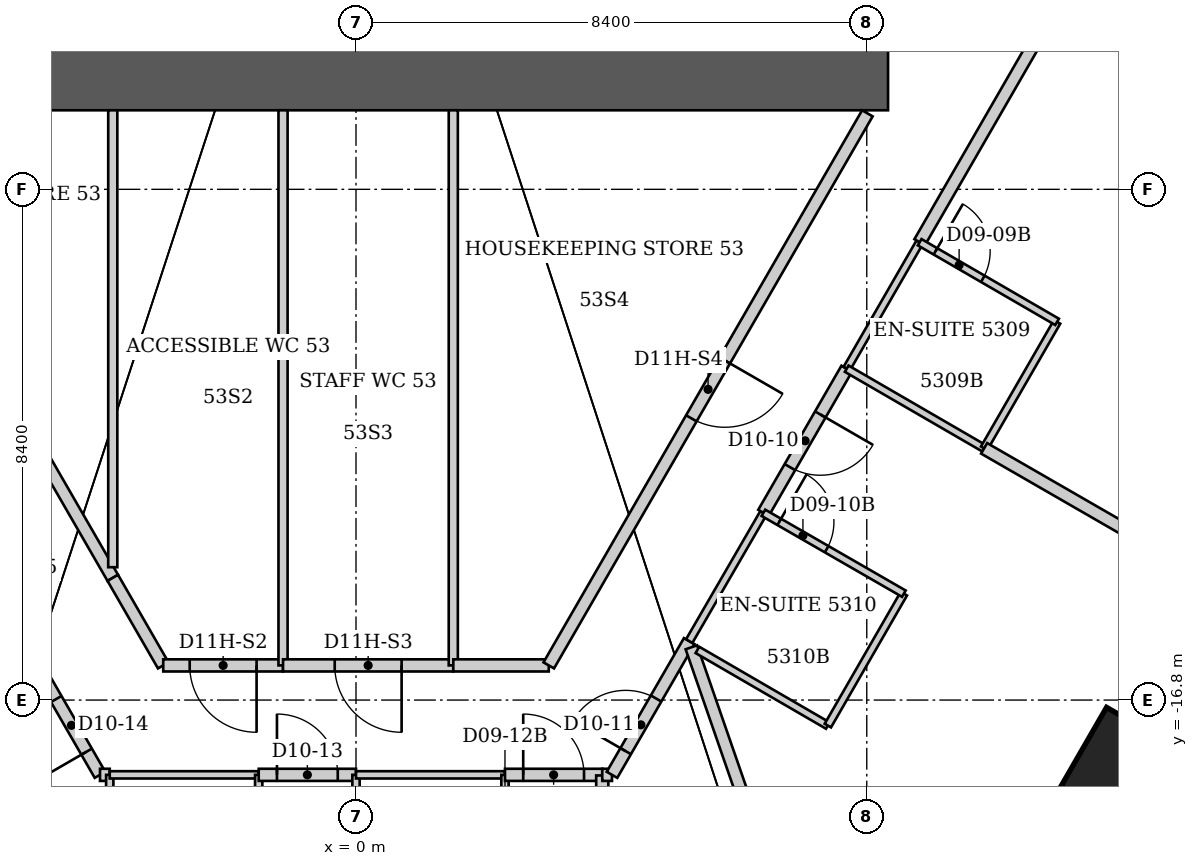
"""IFC4 building model, lengths in metres.
Left out: names, types, materials, properties, quantities, classifications, styles, units other than length and angle.
Written with IfcOpenShell. Run it as: python <this file> out.ifc"""

import sys

from ifc_helpers import new_model, si_unit, direction, frame, frame_2d, origin, origin_2d, place, context, subcontext, project, spatial, rectangle, extrude, element, fill, save


model = new_model("IFC4")
c1 = context("Model", 3, precision=1e-05, world=origin(), true_north=direction((0.0, 1.0)))
c2 = subcontext(c1, "Body", "Model", "MODEL_VIEW")
j1 = project(units=[si_unit("LENGTHUNIT", "METRE"), si_unit("PLANEANGLEUNIT", "RADIAN")], contexts=[c1])
p1 = place(None, origin())
s1 = spatial("IfcSite", under=j1, at=p1, CompositionType="ELEMENT")
p2 = place(p1, origin())
s2 = spatial("IfcBuilding", under=s1, at=p2, CompositionType="ELEMENT")
p3 = place(p2, frame((0.0, 0.0, 213.6)))
s3 = spatial("IfcBuildingStorey", under=s2, at=p3, CompositionType="ELEMENT", Elevation=213.6)
p4 = place(p3, frame((12.618, -17.945, 0.0), z_axis=(0.0, 0.0, 1.0), x_axis=(0.866025403784, -0.5, 0.0)))
e1 = element("IfcColumn", 1, at=p4, inside=s3, PredefinedType="COLUMN", context=c2, shape_type="SweptSolid", body=[
    extrude(rectangle(XDim=1.5, YDim=1.5, at=origin_2d()), origin(), (0.0, 0.0, 1.0), 3.8),
])
p5 = place(p3, frame((-8.75, -6.6, 0.0), z_axis=(0.0, 0.0, 1.0), x_axis=(1.0, 0.0, 0.0)))
e2 = element("IfcWall", 2, at=p5, inside=s3, PredefinedType="SHEAR", context=c2, shape_type="SweptSolid", body=[
    extrude(rectangle(XDim=17.5, YDim=1.0, at=frame_2d((8.75, 0.0))), origin(), (0.0, 0.0, 1.0), 3.8),
])
p6 = place(p3, frame((-5.48, -15.83, 0.0), z_axis=(0.0, 0.0, 1.0), x_axis=(0.499963722229, -0.866046347752, 0.0)))
e3 = element("IfcWall", 3, at=p6, inside=s3, PredefinedType="PARTITIONING", context=c2, shape_type="SweptSolid", body=[
    extrude(rectangle(XDim=2.54, YDim=0.2, at=frame_2d((1.27, 0.0))), origin(), (0.0, 0.0, 1.0), 3.64),
])
p7 = place(p6, frame((1.1, 0.0, 0.0)))
e4 = element("IfcOpeningElement", 4, at=p7, cuts=e3, PredefinedType="OPENING", context=c2, shape_type="SweptSolid", body=[
    extrude(rectangle(XDim=1.0, YDim=2.13, at=frame_2d((0.5, 1.065))), frame((0.0, 0.1, 0.0), z_axis=(0.0, -1.0, 0.0), x_axis=(1.0, 0.0, 0.0)), (0.0, 0.0, 1.0), 0.2),
])
p8 = place(p3, frame((-4.21, -18.03, 0.0), z_axis=(0.0, 0.0, 1.0), x_axis=(1.0, 0.0, 0.0)))
e5 = element("IfcWall", 5, at=p8, inside=s3, PredefinedType="PARTITIONING", context=c2, shape_type="SweptSolid", body=[
    extrude(rectangle(XDim=0.16, YDim=0.2, at=frame_2d((0.08, 0.0))), origin(), (0.0, 0.0, 1.0), 3.64),
])
p9 = place(p3, frame((-4.05, -20.7, 0.0), z_axis=(0.0, 0.0, 1.0), x_axis=(0.0, 1.0, 0.0)))
e6 = element("IfcWall", 6, at=p9, inside=s3, PredefinedType="PARTITIONING", context=c2, shape_type="SweptSolid", body=[
    extrude(rectangle(XDim=2.67, YDim=0.12, at=frame_2d((1.335, 0.0))), origin(), (0.0, 0.0, 1.0), 3.64),
])
p10 = place(p3, frame((-4.05, -18.03, 0.0), z_axis=(0.0, 0.0, 1.0), x_axis=(1.0, 0.0, 0.0)))
e7 = element("IfcWall", 7, at=p10, inside=s3, PredefinedType="PARTITIONING", context=c2, shape_type="SweptSolid", body=[
    extrude(rectangle(XDim=2.45, YDim=0.12, at=frame_2d((1.225, 0.0))), origin(), (0.0, 0.0, 1.0), 3.64),
])
p11 = place(p3, frame((-4.0, -14.79, 0.0), z_axis=(0.0, 0.0, 1.0), x_axis=(-0.499916512745, 0.866073599808, 0.0)))
e8 = element("IfcWall", 8, at=p11, inside=s3, PredefinedType="PARTITIONING", context=c2, shape_type="SweptSolid", body=[
    extrude(rectangle(XDim=8.821, YDim=0.2, at=frame_2d((4.411, 0.0))), origin(), (0.0, 0.0, 1.0), 3.64),
])
p12 = place(p11, frame((3.861, 0.0, 0.0)))
e9 = element("IfcOpeningElement", 9, at=p12, cuts=e8, PredefinedType="OPENING", context=c2, shape_type="SweptSolid", body=[
    extrude(rectangle(XDim=1.1, YDim=2.2, at=frame_2d((0.55, 1.1))), frame((0.0, 0.1, 0.0), z_axis=(0.0, -1.0, 0.0), x_axis=(1.0, 0.0, 0.0)), (0.0, 0.0, 1.0), 0.2),
])
p13 = place(p3, frame((-4.0, -7.1, 0.0), z_axis=(0.0, 0.0, 1.0), x_axis=(0.0, -1.0, 0.0)))
e10 = element("IfcWall", 10, at=p13, inside=s3, PredefinedType="PARTITIONING", context=c2, shape_type="SweptSolid", body=[
    extrude(rectangle(XDim=7.515, YDim=0.15, at=frame_2d((3.757, 0.0))), origin(), (0.0, 0.0, 1.0), 3.64),
])
p14 = place(p3, frame((-3.17, -16.23, 0.0), z_axis=(0.0, 0.0, 1.0), x_axis=(-0.499425709803, 0.866356716594, 0.0)))
e11 = element("IfcWall", 11, at=p14, inside=s3, PredefinedType="PARTITIONING", context=c2, shape_type="SweptSolid", body=[
    extrude(rectangle(XDim=1.662, YDim=0.2, at=frame_2d((0.831, 0.0))), origin(), (0.0, 0.0, 1.0), 3.64),
])
p15 = place(p3, frame((-1.6, -20.7, 0.0), z_axis=(0.0, 0.0, 1.0), x_axis=(0.0, 1.0, 0.0)))
e12 = element("IfcWall", 12, at=p15, inside=s3, PredefinedType="PARTITIONING", context=c2, shape_type="SweptSolid", body=[
    extrude(rectangle(XDim=2.67, YDim=0.12, at=frame_2d((1.335, 0.0))), origin(), (0.0, 0.0, 1.0), 3.64),
])
p16 = place(p15, frame((1.47, 0.0, 0.0)))
e13 = element("IfcOpeningElement", 13, at=p16, cuts=e12, PredefinedType="OPENING", context=c2, shape_type="SweptSolid", body=[
    extrude(rectangle(XDim=0.9, YDim=2.03, at=frame_2d((0.45, 1.015))), frame((0.0, 0.06, 0.0), z_axis=(0.0, -1.0, 0.0), x_axis=(1.0, 0.0, 0.0)), (0.0, 0.0, 1.0), 0.12),
])
p17 = place(p3, frame((-1.6, -18.03, 0.0), z_axis=(0.0, 0.0, 1.0), x_axis=(1.0, 0.0, 0.0)))
e14 = element("IfcWall", 14, at=p17, inside=s3, PredefinedType="PARTITIONING", context=c2, shape_type="SweptSolid", body=[
    extrude(rectangle(XDim=1.6, YDim=0.2, at=frame_2d((0.8, 0.0))), origin(), (0.0, 0.0, 1.0), 3.64),
])
p18 = place(p17, frame((0.3, 0.0, 0.0)))
e15 = element("IfcOpeningElement", 15, at=p18, cuts=e14, PredefinedType="OPENING", context=c2, shape_type="SweptSolid", body=[
    extrude(rectangle(XDim=1.0, YDim=2.13, at=frame_2d((0.5, 1.065))), frame((0.0, 0.1, 0.0), z_axis=(0.0, -1.0, 0.0), x_axis=(1.0, 0.0, 0.0)), (0.0, 0.0, 1.0), 0.2),
])
p19 = place(p3, frame((-1.2, -16.23, 0.0), z_axis=(0.0, 0.0, 1.0), x_axis=(-1.0, 0.0, 0.0)))
e16 = element("IfcWall", 16, at=p19, inside=s3, PredefinedType="PARTITIONING", context=c2, shape_type="SweptSolid", body=[
    extrude(rectangle(XDim=1.97, YDim=0.2, at=frame_2d((0.985, 0.0))), origin(), (0.0, 0.0, 1.0), 3.64),
])
p20 = place(p19, frame((0.435, 0.0, 0.0)))
e17 = element("IfcOpeningElement", 17, at=p20, cuts=e16, PredefinedType="OPENING", context=c2, shape_type="SweptSolid", body=[
    extrude(rectangle(XDim=1.1, YDim=2.2, at=frame_2d((0.55, 1.1))), frame((0.0, 0.1, 0.0), z_axis=(0.0, -1.0, 0.0), x_axis=(1.0, 0.0, 0.0)), (0.0, 0.0, 1.0), 0.2),
])
p21 = place(p3, frame((-1.2, -7.1, 0.0), z_axis=(0.0, 0.0, 1.0), x_axis=(0.0, -1.0, 0.0)))
e18 = element("IfcWall", 18, at=p21, inside=s3, PredefinedType="PARTITIONING", context=c2, shape_type="SweptSolid", body=[
    extrude(rectangle(XDim=9.13, YDim=0.15, at=frame_2d((4.565, 0.0))), origin(), (0.0, 0.0, 1.0), 3.64),
])
p22 = place(p3, frame((0.0, -20.7, 0.0), z_axis=(0.0, 0.0, 1.0), x_axis=(0.0, 1.0, 0.0)))
e19 = element("IfcWall", 19, at=p22, inside=s3, PredefinedType="PARTITIONING", context=c2, shape_type="SweptSolid", body=[
    extrude(rectangle(XDim=2.67, YDim=0.12, at=frame_2d((1.335, 0.0))), origin(), (0.0, 0.0, 1.0), 2.726),
])
p23 = place(p3, frame((0.0, -18.03, 0.0), z_axis=(0.0, 0.0, 1.0), x_axis=(1.0, 0.0, 0.0)))
e20 = element("IfcWall", 20, at=p23, inside=s3, PredefinedType="PARTITIONING", context=c2, shape_type="SweptSolid", body=[
    extrude(rectangle(XDim=2.45, YDim=0.12, at=frame_2d((1.225, 0.0))), origin(), (0.0, 0.0, 1.0), 3.64),
])
p24 = place(p3, frame((1.6, -16.23, 0.0), z_axis=(0.0, 0.0, 1.0), x_axis=(-1.0, 0.0, 0.0)))
e21 = element("IfcWall", 21, at=p24, inside=s3, PredefinedType="PARTITIONING", context=c2, shape_type="SweptSolid", body=[
    extrude(rectangle(XDim=2.8, YDim=0.2, at=frame_2d((1.4, 0.0))), origin(), (0.0, 0.0, 1.0), 3.64),
])
p25 = place(p24, frame((0.85, 0.0, 0.0)))
e22 = element("IfcOpeningElement", 22, at=p25, cuts=e21, PredefinedType="OPENING", context=c2, shape_type="SweptSolid", body=[
    extrude(rectangle(XDim=1.1, YDim=2.2, at=frame_2d((0.55, 1.1))), frame((0.0, 0.1, 0.0), z_axis=(0.0, -1.0, 0.0), x_axis=(1.0, 0.0, 0.0)), (0.0, 0.0, 1.0), 0.2),
])
p26 = place(p3, frame((1.6, -7.1, 0.0), z_axis=(0.0, 0.0, 1.0), x_axis=(0.0, -1.0, 0.0)))
e23 = element("IfcWall", 23, at=p26, inside=s3, PredefinedType="PARTITIONING", context=c2, shape_type="SweptSolid", body=[
    extrude(rectangle(XDim=9.13, YDim=0.15, at=frame_2d((4.565, 0.0))), origin(), (0.0, 0.0, 1.0), 3.64),
])
p27 = place(p3, frame((2.45, -20.7, 0.0), z_axis=(0.0, 0.0, 1.0), x_axis=(0.0, 1.0, 0.0)))
e24 = element("IfcWall", 24, at=p27, inside=s3, PredefinedType="PARTITIONING", context=c2, shape_type="SweptSolid", body=[
    extrude(rectangle(XDim=2.67, YDim=0.12, at=frame_2d((1.335, 0.0))), origin(), (0.0, 0.0, 1.0), 3.64),
])
p28 = place(p27, frame((1.47, 0.0, 0.0)))
e25 = element("IfcOpeningElement", 25, at=p28, cuts=e24, PredefinedType="OPENING", context=c2, shape_type="SweptSolid", body=[
    extrude(rectangle(XDim=0.9, YDim=2.03, at=frame_2d((0.45, 1.015))), frame((0.0, 0.06, 0.0), z_axis=(0.0, -1.0, 0.0), x_axis=(1.0, 0.0, 0.0)), (0.0, 0.0, 1.0), 0.12),
])
p29 = place(p3, frame((2.45, -18.03, 0.0), z_axis=(0.0, 0.0, 1.0), x_axis=(1.0, 0.0, 0.0)))
e26 = element("IfcWall", 26, at=p29, inside=s3, PredefinedType="PARTITIONING", context=c2, shape_type="SweptSolid", body=[
    extrude(rectangle(XDim=1.6, YDim=0.2, at=frame_2d((0.8, 0.0))), origin(), (0.0, 0.0, 1.0), 3.64),
])
p30 = place(p29, frame((0.3, 0.0, 0.0)))
e27 = element("IfcOpeningElement", 27, at=p30, cuts=e26, PredefinedType="OPENING", context=c2, shape_type="SweptSolid", body=[
    extrude(rectangle(XDim=1.0, YDim=2.13, at=frame_2d((0.5, 1.065))), frame((0.0, 0.1, 0.0), z_axis=(0.0, -1.0, 0.0), x_axis=(1.0, 0.0, 0.0)), (0.0, 0.0, 1.0), 0.2),
])
p31 = place(p3, frame((3.17, -16.23, 0.0), z_axis=(0.0, 0.0, 1.0), x_axis=(-1.0, 0.0, 0.0)))
e28 = element("IfcWall", 28, at=p31, inside=s3, PredefinedType="PARTITIONING", context=c2, shape_type="SweptSolid", body=[
    extrude(rectangle(XDim=1.57, YDim=0.2, at=frame_2d((0.785, 0.0))), origin(), (0.0, 0.0, 1.0), 3.64),
])
p32 = place(p3, frame((4.05, -21.87, 0.0), z_axis=(0.0, 0.0, 1.0), x_axis=(0.0, 1.0, 0.0)))
e29 = element("IfcWall", 29, at=p32, inside=s3, PredefinedType="PARTITIONING", context=c2, shape_type="SweptSolid", body=[
    extrude(rectangle(XDim=3.83, YDim=0.2, at=frame_2d((1.915, 0.0))), origin(), (0.0, 0.0, 1.0), 3.64),
])
p33 = place(p3, frame((4.05, -18.03, 0.0), z_axis=(0.0, 0.0, 1.0), x_axis=(1.0, 0.0, 0.0)))
e30 = element("IfcWall", 30, at=p33, inside=s3, PredefinedType="PARTITIONING", context=c2, shape_type="SweptSolid", body=[
    extrude(rectangle(XDim=0.16, YDim=0.2, at=frame_2d((0.08, 0.0))), origin(), (0.0, 0.0, 1.0), 3.64),
])
p34 = place(p3, frame((4.21, -18.03, 0.0), z_axis=(0.0, 0.0, 1.0), x_axis=(0.499963722229, 0.866046347752, 0.0)))
e31 = element("IfcWall", 31, at=p34, inside=s3, PredefinedType="PARTITIONING", context=c2, shape_type="SweptSolid", body=[
    extrude(rectangle(XDim=2.54, YDim=0.2, at=frame_2d((1.27, 0.0))), origin(), (0.0, 0.0, 1.0), 3.64),
])
p35 = place(p34, frame((0.45, 0.0, 0.0)))
e32 = element("IfcOpeningElement", 32, at=p35, cuts=e31, PredefinedType="OPENING", context=c2, shape_type="SweptSolid", body=[
    extrude(rectangle(XDim=1.0, YDim=2.13, at=frame_2d((0.5, 1.065))), frame((0.0, 0.1, 0.0), z_axis=(0.0, -1.0, 0.0), x_axis=(1.0, 0.0, 0.0)), (0.0, 0.0, 1.0), 0.2),
])
p36 = place(p3, frame((5.48, -15.83, 0.0), z_axis=(0.0, 0.0, 1.0), x_axis=(0.50122183301, 0.865318828013, 0.0)))
e33 = element("IfcWall", 33, at=p36, inside=s3, PredefinedType="PARTITIONING", context=c2, shape_type="SweptSolid", body=[
    extrude(rectangle(XDim=2.438, YDim=0.12, at=frame_2d((1.219, 0.0))), origin(), (0.0, 0.0, 1.0), 3.64),
])
p37 = place(p3, frame((5.515, -15.932, 0.0), z_axis=(0.0, 0.0, 1.0), x_axis=(0.327594697431, -0.944818349851, 0.0)))
e34 = element("IfcWall", 34, at=p37, inside=s3, PredefinedType="PARTITIONING", context=c2, shape_type="SweptSolid", body=[
    extrude(rectangle(XDim=10.668, YDim=0.2, at=frame_2d((5.334, 0.0))), origin(), (0.0, 0.0, 1.0), 3.64),
])
p38 = place(p3, frame((5.615, -15.975, 0.0), z_axis=(0.0, 0.0, 1.0), x_axis=(0.864873056518, -0.501990633487, 0.0)))
e35 = element("IfcWall", 35, at=p38, inside=s3, PredefinedType="PARTITIONING", context=c2, shape_type="SweptSolid", body=[
    extrude(rectangle(XDim=2.48, YDim=0.12, at=frame_2d((1.24, 0.0))), origin(), (0.0, 0.0, 1.0), 3.038),
])
p39 = place(p3, frame((7.76, -17.22, 0.0), z_axis=(0.0, 0.0, 1.0), x_axis=(0.499159685399, 0.866510016372, 0.0)))
e36 = element("IfcWall", 36, at=p39, inside=s3, PredefinedType="PARTITIONING", context=c2, shape_type="SweptSolid", body=[
    extrude(rectangle(XDim=2.504, YDim=0.12, at=frame_2d((1.252, 0.0))), origin(), (0.0, 0.0, 1.0), 3.64),
])
p40 = place(p3, frame((8.07, -11.35, 0.0), z_axis=(0.0, 0.0, 1.0), x_axis=(-0.499889730522, -0.866089058537, 0.0)))
e37 = element("IfcWall", 37, at=p40, inside=s3, PredefinedType="PARTITIONING", context=c2, shape_type="SweptSolid", body=[
    extrude(rectangle(XDim=2.737, YDim=0.2, at=frame_2d((1.369, 0.0))), origin(), (0.0, 0.0, 1.0), 3.64),
])
p41 = place(p40, frame((0.869, 0.0, 0.0)))
e38 = element("IfcOpeningElement", 38, at=p41, cuts=e37, PredefinedType="OPENING", context=c2, shape_type="SweptSolid", body=[
    extrude(rectangle(XDim=1.0, YDim=2.13, at=frame_2d((0.5, 1.065))), frame((0.0, 0.1, 0.0), z_axis=(0.0, -1.0, 0.0), x_axis=(1.0, 0.0, 0.0)), (0.0, 0.0, 1.0), 0.2),
])
p42 = place(p3, frame((8.07, -11.35, 0.0), z_axis=(0.0, 0.0, 1.0), x_axis=(0.499693115345, 0.866202511239, 0.0)))
e39 = element("IfcWall", 39, at=p42, inside=s3, PredefinedType="PARTITIONING", context=c2, shape_type="SweptSolid", body=[
    extrude(rectangle(XDim=2.401, YDim=0.12, at=frame_2d((1.201, 0.0))), origin(), (0.0, 0.0, 1.0), 3.64),
])
p43 = place(p3, frame((8.07, -11.35, 0.0), z_axis=(0.0, 0.0, 1.0), x_axis=(0.865195830568, -0.501434118073, 0.0)))
e40 = element("IfcWall", 40, at=p43, inside=s3, PredefinedType="PARTITIONING", context=c2, shape_type="SweptSolid", body=[
    extrude(rectangle(XDim=2.612, YDim=0.12, at=frame_2d((1.306, 0.0))), origin(), (0.0, 0.0, 1.0), 3.64),
])
p44 = place(p3, frame((8.41, -7.15, 0.0), z_axis=(0.0, 0.0, 1.0), x_axis=(-0.499828628176, -0.866124322748, 0.0)))
e41 = element("IfcWall", 41, at=p44, inside=s3, PredefinedType="PARTITIONING", context=c2, shape_type="SweptSolid", body=[
    extrude(rectangle(XDim=10.484, YDim=0.2, at=frame_2d((5.242, 0.0))), origin(), (0.0, 0.0, 1.0), 3.64),
])
p45 = place(p44, frame((4.692, 0.0, 0.0)))
e42 = element("IfcOpeningElement", 42, at=p45, cuts=e41, PredefinedType="OPENING", context=c2, shape_type="SweptSolid", body=[
    extrude(rectangle(XDim=1.1, YDim=2.2, at=frame_2d((0.55, 1.1))), frame((0.0, 0.1, 0.0), z_axis=(0.0, -1.0, 0.0), x_axis=(1.0, 0.0, 0.0)), (0.0, 0.0, 1.0), 0.2),
])
p46 = place(p3, frame((9.01, -15.05, 0.0), z_axis=(0.0, 0.0, 1.0), x_axis=(-0.866615255992, 0.498976951453, 0.0)))
e43 = element("IfcWall", 43, at=p46, inside=s3, PredefinedType="PARTITIONING", context=c2, shape_type="SweptSolid", body=[
    extrude(rectangle(XDim=2.666, YDim=0.12, at=frame_2d((1.333, 0.0))), origin(), (0.0, 0.0, 1.0), 3.64),
])
p47 = place(p46, frame((1.466, 0.0, 0.0)))
e44 = element("IfcOpeningElement", 44, at=p47, cuts=e43, PredefinedType="OPENING", context=c2, shape_type="SweptSolid", body=[
    extrude(rectangle(XDim=0.9, YDim=2.03, at=frame_2d((0.45, 1.015))), frame((0.0, 0.06, 0.0), z_axis=(0.0, -1.0, 0.0), x_axis=(1.0, 0.0, 0.0)), (0.0, 0.0, 1.0), 0.12),
])
p48 = place(p3, frame((9.27, -9.27, 0.0), z_axis=(0.0, 0.0, 1.0), x_axis=(0.499543028754, 0.866289075554, 0.0)))
e45 = element("IfcWall", 45, at=p48, inside=s3, PredefinedType="PARTITIONING", context=c2, shape_type="SweptSolid", body=[
    extrude(rectangle(XDim=9.188, YDim=0.2, at=frame_2d((4.594, 0.0))), origin(), (0.0, 0.0, 1.0), 3.64),
])
p49 = place(p48, frame((4.094, 0.0, 0.0)))
e46 = element("IfcOpeningElement", 46, at=p49, cuts=e45, PredefinedType="OPENING", context=c2, shape_type="SweptSolid", body=[
    extrude(rectangle(XDim=1.0, YDim=2.13, at=frame_2d((0.5, 1.065))), frame((0.0, 0.1, 0.0), z_axis=(0.0, -1.0, 0.0), x_axis=(1.0, 0.0, 0.0)), (0.0, 0.0, 1.0), 0.2),
])
p50 = place(p3, frame((10.33, -12.66, 0.0), z_axis=(0.0, 0.0, 1.0), x_axis=(0.499737123639, 0.866177122335, 0.0)))
e47 = element("IfcWall", 47, at=p50, inside=s3, PredefinedType="PARTITIONING", context=c2, shape_type="SweptSolid", body=[
    extrude(rectangle(XDim=2.401, YDim=0.12, at=frame_2d((1.201, 0.0))), origin(), (0.0, 0.0, 1.0), 3.64),
])
p51 = place(p3, frame((10.33, -12.66, 0.0), z_axis=(0.0, 0.0, 1.0), x_axis=(0.866342721203, -0.499449986905, 0.0)))
e48 = element("IfcWall", 48, at=p51, inside=s3, PredefinedType="PARTITIONING", context=c2, shape_type="SweptSolid", body=[
    extrude(rectangle(XDim=5.767, YDim=0.2, at=frame_2d((2.883, 0.0))), origin(), (0.0, 0.0, 1.0), 3.64),
])
p52 = place(p3, frame((11.53, -10.58, 0.0), z_axis=(0.0, 0.0, 1.0), x_axis=(-0.865155281359, 0.50150407689, 0.0)))
e49 = element("IfcWall", 49, at=p52, inside=s3, PredefinedType="PARTITIONING", context=c2, shape_type="SweptSolid", body=[
    extrude(rectangle(XDim=2.612, YDim=0.12, at=frame_2d((1.306, 0.0))), origin(), (0.0, 0.0, 1.0), 3.64),
])
p53 = place(p52, frame((1.412, 0.0, 0.0)))
e50 = element("IfcOpeningElement", 50, at=p53, cuts=e49, PredefinedType="OPENING", context=c2, shape_type="SweptSolid", body=[
    extrude(rectangle(XDim=0.9, YDim=2.03, at=frame_2d((0.45, 1.015))), frame((0.0, 0.06, 0.0), z_axis=(0.0, -1.0, 0.0), x_axis=(1.0, 0.0, 0.0)), (0.0, 0.0, 1.0), 0.12),
])
p54 = place(p53, origin())
e51 = element("IfcDoor", 51, at=p54, inside=s3, OperationType="SINGLE_SWING_RIGHT", PredefinedType="DOOR", context=c2, shape_type="SweptSolid", body=[
    extrude(rectangle(XDim=0.9, YDim=2.03, at=frame_2d((0.45, 1.015))), frame((0.0, 0.025, 0.0), z_axis=(0.0, -1.0, 0.0), x_axis=(1.0, 0.0, 0.0)), (0.0, 0.0, 1.0), 0.05),
])
fill(e50, e51)
p55 = place(p41, origin())
e52 = element("IfcDoor", 52, at=p55, inside=s3, OperationType="SINGLE_SWING_LEFT", PredefinedType="DOOR", context=c2, shape_type="SweptSolid", body=[
    extrude(rectangle(XDim=1.0, YDim=2.13, at=frame_2d((0.5, 1.065))), frame((0.0, 0.025, 0.0), z_axis=(0.0, -1.0, 0.0), x_axis=(1.0, 0.0, 0.0)), (0.0, 0.0, 1.0), 0.05),
])
fill(e38, e52)
p56 = place(p47, origin())
e53 = element("IfcDoor", 53, at=p56, inside=s3, OperationType="SINGLE_SWING_RIGHT", PredefinedType="DOOR", context=c2, shape_type="SweptSolid", body=[
    extrude(rectangle(XDim=0.9, YDim=2.03, at=frame_2d((0.45, 1.015))), frame((0.0, 0.025, 0.0), z_axis=(0.0, -1.0, 0.0), x_axis=(1.0, 0.0, 0.0)), (0.0, 0.0, 1.0), 0.05),
])
fill(e44, e53)
p57 = place(p35, origin())
e54 = element("IfcDoor", 54, at=p57, inside=s3, OperationType="SINGLE_SWING_LEFT", PredefinedType="DOOR", context=c2, shape_type="SweptSolid", body=[
    extrude(rectangle(XDim=1.0, YDim=2.13, at=frame_2d((0.5, 1.065))), frame((0.0, 0.025, 0.0), z_axis=(0.0, -1.0, 0.0), x_axis=(1.0, 0.0, 0.0)), (0.0, 0.0, 1.0), 0.05),
])
fill(e32, e54)
p58 = place(p30, origin())
e55 = element("IfcDoor", 55, at=p58, inside=s3, OperationType="SINGLE_SWING_LEFT", PredefinedType="DOOR", context=c2, shape_type="SweptSolid", body=[
    extrude(rectangle(XDim=1.0, YDim=2.13, at=frame_2d((0.5, 1.065))), frame((0.0, 0.025, 0.0), z_axis=(0.0, -1.0, 0.0), x_axis=(1.0, 0.0, 0.0)), (0.0, 0.0, 1.0), 0.05),
])
fill(e27, e55)
p59 = place(p18, origin())
e56 = element("IfcDoor", 56, at=p59, inside=s3, OperationType="SINGLE_SWING_LEFT", PredefinedType="DOOR", context=c2, shape_type="SweptSolid", body=[
    extrude(rectangle(XDim=1.0, YDim=2.13, at=frame_2d((0.5, 1.065))), frame((0.0, 0.025, 0.0), z_axis=(0.0, -1.0, 0.0), x_axis=(1.0, 0.0, 0.0)), (0.0, 0.0, 1.0), 0.05),
])
fill(e15, e56)
p60 = place(p7, origin())
e57 = element("IfcDoor", 57, at=p60, inside=s3, OperationType="SINGLE_SWING_RIGHT", PredefinedType="DOOR", context=c2, shape_type="SweptSolid", body=[
    extrude(rectangle(XDim=1.0, YDim=2.13, at=frame_2d((0.5, 1.065))), frame((0.0, 0.025, 0.0), z_axis=(0.0, -1.0, 0.0), x_axis=(1.0, 0.0, 0.0)), (0.0, 0.0, 1.0), 0.05),
])
fill(e4, e57)
p61 = place(p20, origin())
e58 = element("IfcDoor", 58, at=p61, inside=s3, OperationType="SINGLE_SWING_LEFT", PredefinedType="DOOR", context=c2, shape_type="SweptSolid", body=[
    extrude(rectangle(XDim=1.1, YDim=2.2, at=frame_2d((0.55, 1.1))), frame((0.0, 0.025, 0.0), z_axis=(0.0, -1.0, 0.0), x_axis=(1.0, 0.0, 0.0)), (0.0, 0.0, 1.0), 0.05),
])
fill(e17, e58)
p62 = place(p25, origin())
e59 = element("IfcDoor", 59, at=p62, inside=s3, OperationType="SINGLE_SWING_LEFT", PredefinedType="DOOR", context=c2, shape_type="SweptSolid", body=[
    extrude(rectangle(XDim=1.1, YDim=2.2, at=frame_2d((0.55, 1.1))), frame((0.0, 0.025, 0.0), z_axis=(0.0, -1.0, 0.0), x_axis=(1.0, 0.0, 0.0)), (0.0, 0.0, 1.0), 0.05),
])
fill(e22, e59)
p63 = place(p45, origin())
e60 = element("IfcDoor", 60, at=p63, inside=s3, OperationType="SINGLE_SWING_LEFT", PredefinedType="DOOR", context=c2, shape_type="SweptSolid", body=[
    extrude(rectangle(XDim=1.1, YDim=2.2, at=frame_2d((0.55, 1.1))), frame((0.0, 0.025, 0.0), z_axis=(0.0, -1.0, 0.0), x_axis=(1.0, 0.0, 0.0)), (0.0, 0.0, 1.0), 0.05),
])
fill(e42, e60)
save(model, sys.argv[1])
